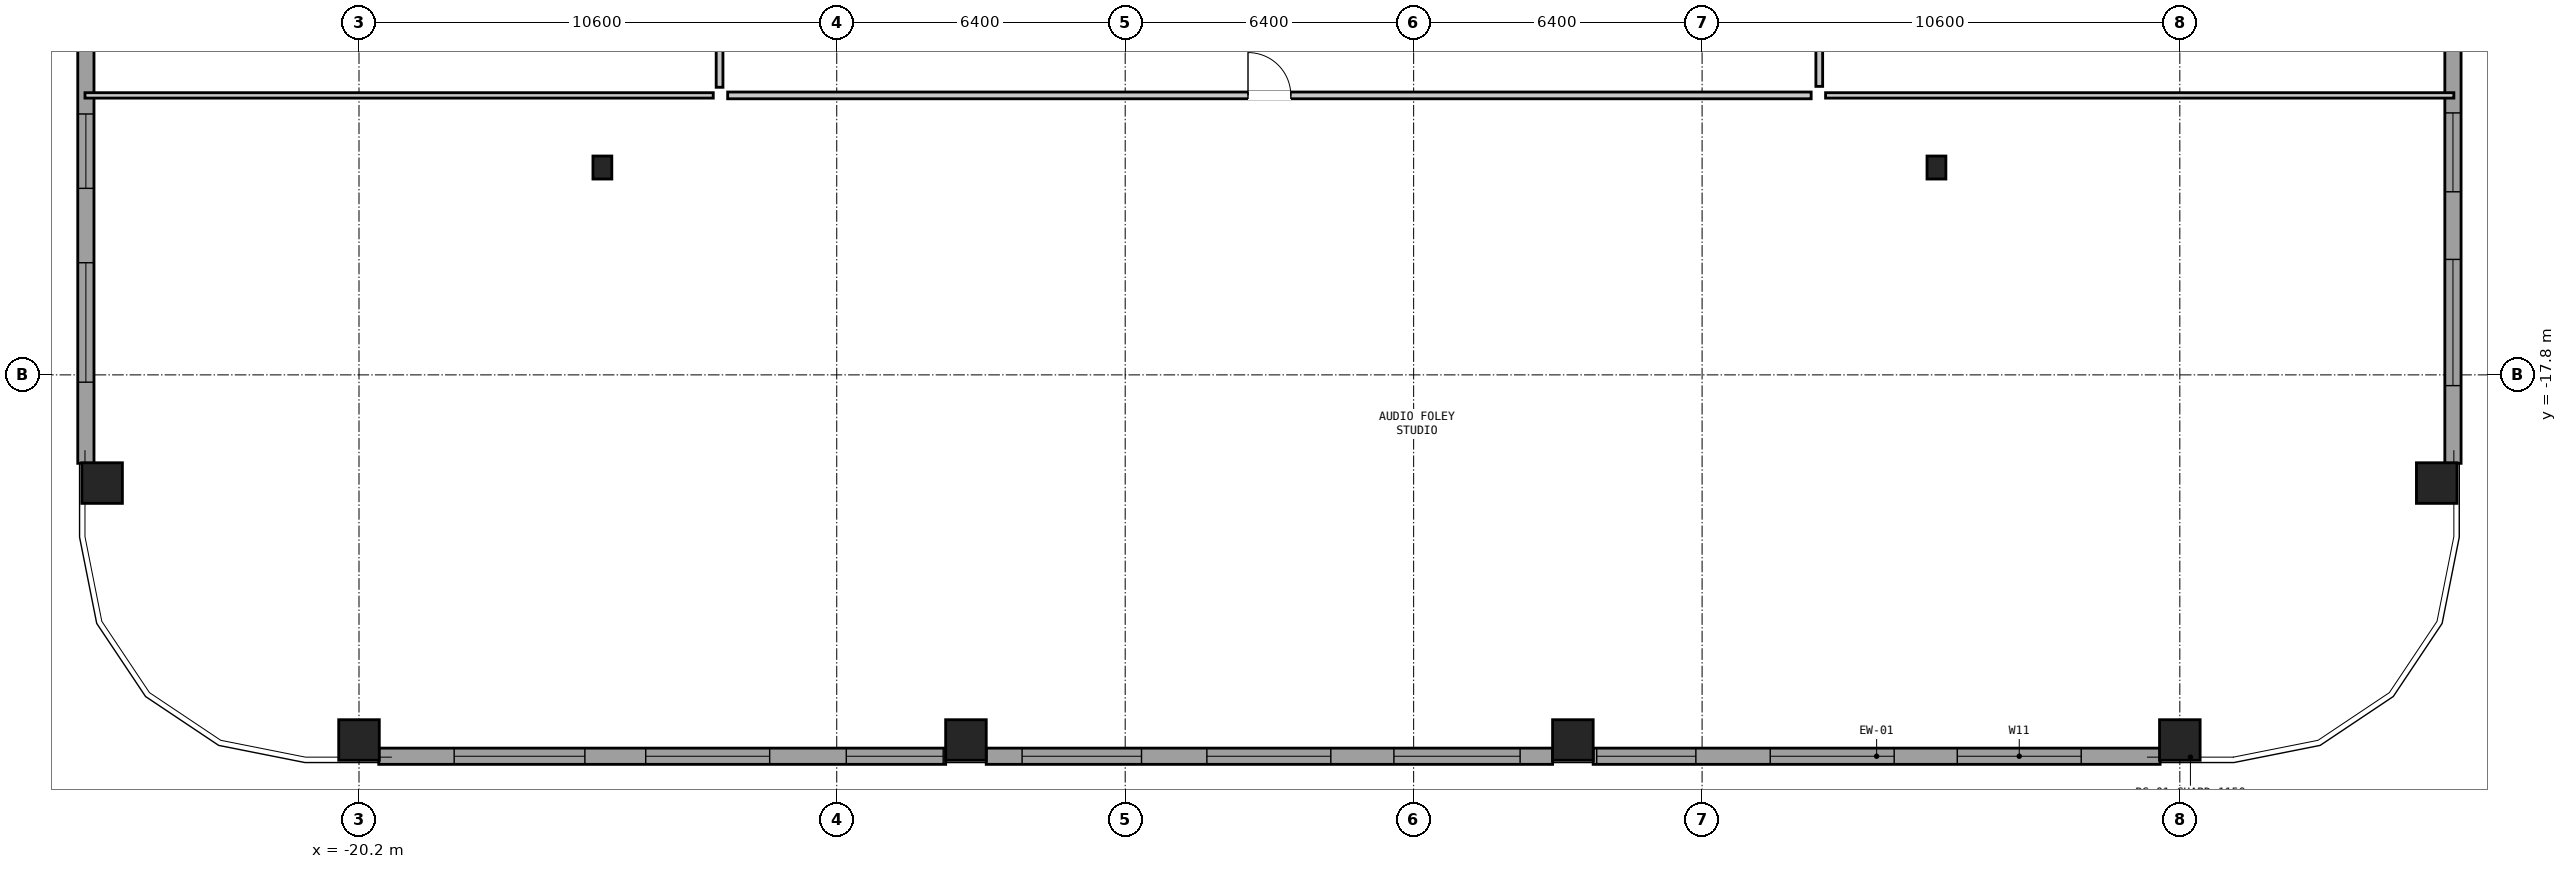
"""IFC4 building model, lengths in metres.
Left out: names, types, materials, properties, quantities, classifications, styles, units other than length and angle.
Written with IfcOpenShell. Run it as: python <this file> out.ifc"""

import sys

from ifc_helpers import new_model, si_unit, direction, frame, frame_2d, origin, origin_2d, place, context, subcontext, project, spatial, rectangle, hollow_rectangle, i_section, extrude, element, fill, save


model = new_model("IFC4")
c1 = context("Model", 3, precision=1e-05, world=origin(), true_north=direction((0.0, 1.0)))
c2 = subcontext(c1, "Body", "Model", "MODEL_VIEW")
j1 = project(units=[si_unit("LENGTHUNIT", "METRE"), si_unit("PLANEANGLEUNIT", "RADIAN")], contexts=[c1])
p1 = place(None, origin())
s1 = spatial("IfcSite", under=j1, at=p1, CompositionType="ELEMENT")
p2 = place(p1, origin())
s2 = spatial("IfcBuilding", under=s1, at=p2, CompositionType="ELEMENT")
p3 = place(p2, frame((0.0, 0.0, 29.15)))
s3 = spatial("IfcBuildingStorey", under=s2, at=p3, CompositionType="ELEMENT", Elevation=29.15)
for number, where, z_axis, x_axis in (
    (1, (-20.2, -25.9, 0.0), (0.0, 0.0, 1.0), (1.0, 0.0, 0.0)),
    (2, (-6.733, -25.9, 0.0), (0.0, 0.0, 1.0), (1.0, 0.0, 0.0)),
    (3, (6.733, -25.9, 0.0), (0.0, 0.0, 1.0), (1.0, 0.0, 0.0)),
    (4, (20.2, -25.9, 0.0), (0.0, 0.0, 1.0), (1.0, 0.0, 0.0)),
    (5, (25.9, -20.2, 0.0), (0.0, 0.0, 1.0), (0.0, 1.0, 0.0)),
    (6, (-25.9, -20.2, 0.0), (0.0, 0.0, 1.0), (0.0, 1.0, 0.0)),
):
    element("IfcColumn", number, at=place(p3, frame(where, z_axis=z_axis, x_axis=x_axis)), inside=s3, PredefinedType="COLUMN", context=c2, shape_type="SweptSolid", body=[
        extrude(hollow_rectangle(XDim=0.9, YDim=0.9, WallThickness=0.055, at=origin_2d()), origin(), (0.0, 0.0, 1.0), 3.05),
    ])
for number, where, z_axis, x_axis in (
    (7, (-14.8, -13.2, 0.0), (0.0, 0.0, 1.0), (1.0, 0.0, 0.0)),
    (8, (14.8, -13.2, 0.0), (0.0, 0.0, 1.0), (1.0, 0.0, 0.0)),
):
    element("IfcColumn", number, at=place(p3, frame(where, z_axis=z_axis, x_axis=x_axis)), inside=s3, PredefinedType="COLUMN", context=c2, shape_type="SweptSolid", body=[
        extrude(i_section(OverallWidth=0.418, OverallDepth=0.51, WebThickness=0.042, FlangeThickness=0.068, at=origin_2d()), origin(), (0.0, 0.0, 1.0), 3.05),
    ])
p4 = place(p3, frame((19.762, -26.26, 0.0), z_axis=(0.0, 0.0, 1.0), x_axis=(-1.0, 0.0, 0.0)))
e9 = element("IfcWall", 9, at=p4, inside=s3, PredefinedType="SOLIDWALL", context=c2, shape_type="SweptSolid", body=[
    extrude(rectangle(XDim=12.579, YDim=0.36, at=frame_2d((6.289, 0.0))), origin(), (0.0, 0.0, 1.0), 2.067),
])
p5 = place(p4, frame((1.75, 0.0, 0.2)))
e10 = element("IfcOpeningElement", 10, at=p5, cuts=e9, PredefinedType="OPENING", context=c2, shape_type="SweptSolid", body=[
    extrude(rectangle(XDim=2.75, YDim=0.95, at=frame_2d((1.375, 0.475))), frame((0.0, 0.192, 0.0), z_axis=(0.0, -1.0, 0.0), x_axis=(1.0, 0.0, 0.0)), (0.0, 0.0, 1.0), 0.384),
])
p6 = place(p4, frame((5.9, 0.0, 0.95)))
e11 = element("IfcOpeningElement", 11, at=p6, cuts=e9, PredefinedType="OPENING", context=c2, shape_type="SweptSolid", body=[
    extrude(rectangle(XDim=2.75, YDim=0.95, at=frame_2d((1.375, 0.475))), frame((0.0, 0.192, 0.0), z_axis=(0.0, -1.0, 0.0), x_axis=(1.0, 0.0, 0.0)), (0.0, 0.0, 1.0), 0.384),
])
p7 = place(p4, frame((10.3, 0.0, 0.2)))
e12 = element("IfcOpeningElement", 12, at=p7, cuts=e9, PredefinedType="OPENING", context=c2, shape_type="SweptSolid", body=[
    extrude(rectangle(XDim=2.2, YDim=1.1, at=frame_2d((1.1, 0.55))), frame((0.0, 0.192, 0.0), z_axis=(0.0, -1.0, 0.0), x_axis=(1.0, 0.0, 0.0)), (0.0, 0.0, 1.0), 0.384),
])
p8 = place(p3, frame((6.283, -26.26, 0.0), z_axis=(0.0, 0.0, 1.0), x_axis=(-1.0, 0.0, 0.0)))
e13 = element("IfcWall", 13, at=p8, inside=s3, PredefinedType="SOLIDWALL", context=c2, shape_type="SweptSolid", body=[
    extrude(rectangle(XDim=12.566, YDim=0.36, at=frame_2d((6.283, 0.0))), origin(), (0.0, 0.0, 1.0), 2.067),
])
p9 = place(p8, frame((0.721, 0.0, 0.95)))
e14 = element("IfcOpeningElement", 14, at=p9, cuts=e13, PredefinedType="OPENING", context=c2, shape_type="SweptSolid", body=[
    extrude(rectangle(XDim=2.8, YDim=0.95, at=frame_2d((1.4, 0.475))), frame((0.0, 0.192, 0.0), z_axis=(0.0, -1.0, 0.0), x_axis=(1.0, 0.0, 0.0)), (0.0, 0.0, 1.0), 0.384),
])
p10 = place(p8, frame((4.921, 0.0, 0.2)))
e15 = element("IfcOpeningElement", 15, at=p10, cuts=e13, PredefinedType="OPENING", context=c2, shape_type="SweptSolid", body=[
    extrude(rectangle(XDim=2.75, YDim=0.95, at=frame_2d((1.375, 0.475))), frame((0.0, 0.192, 0.0), z_axis=(0.0, -1.0, 0.0), x_axis=(1.0, 0.0, 0.0)), (0.0, 0.0, 1.0), 0.384),
])
p11 = place(p8, frame((9.121, 0.0, 0.9)))
e16 = element("IfcOpeningElement", 16, at=p11, cuts=e13, PredefinedType="OPENING", context=c2, shape_type="SweptSolid", body=[
    extrude(rectangle(XDim=2.65, YDim=1.0, at=frame_2d((1.325, 0.5))), frame((0.0, 0.192, 0.0), z_axis=(0.0, -1.0, 0.0), x_axis=(1.0, 0.0, 0.0)), (0.0, 0.0, 1.0), 0.384),
])
p12 = place(p3, frame((-7.183, -26.26, 0.0), z_axis=(0.0, 0.0, 1.0), x_axis=(-1.0, 0.0, 0.0)))
e17 = element("IfcWall", 17, at=p12, inside=s3, PredefinedType="SOLIDWALL", context=c2, shape_type="SweptSolid", body=[
    extrude(rectangle(XDim=12.579, YDim=0.36, at=frame_2d((6.289, 0.0))), origin(), (0.0, 0.0, 1.0), 2.067),
])
p13 = place(p12, frame((0.055, 0.0, 0.2)))
e18 = element("IfcOpeningElement", 18, at=p13, cuts=e17, PredefinedType="OPENING", context=c2, shape_type="SweptSolid", body=[
    extrude(rectangle(XDim=2.15, YDim=1.15, at=frame_2d((1.075, 0.575))), frame((0.0, 0.192, 0.0), z_axis=(0.0, -1.0, 0.0), x_axis=(1.0, 0.0, 0.0)), (0.0, 0.0, 1.0), 0.384),
])
p14 = place(p12, frame((3.905, 0.0, 0.95)))
e19 = element("IfcOpeningElement", 19, at=p14, cuts=e17, PredefinedType="OPENING", context=c2, shape_type="SweptSolid", body=[
    extrude(rectangle(XDim=2.75, YDim=0.95, at=frame_2d((1.375, 0.475))), frame((0.0, 0.192, 0.0), z_axis=(0.0, -1.0, 0.0), x_axis=(1.0, 0.0, 0.0)), (0.0, 0.0, 1.0), 0.384),
])
p15 = place(p12, frame((8.005, 0.0, 0.2)))
e20 = element("IfcOpeningElement", 20, at=p15, cuts=e17, PredefinedType="OPENING", context=c2, shape_type="SweptSolid", body=[
    extrude(rectangle(XDim=2.9, YDim=0.9, at=frame_2d((1.45, 0.45))), frame((0.0, 0.192, 0.0), z_axis=(0.0, -1.0, 0.0), x_axis=(1.0, 0.0, 0.0)), (0.0, 0.0, 1.0), 0.384),
])
p16 = place(p3, frame((26.26, -7.183, 0.0), z_axis=(0.0, 0.0, 1.0), x_axis=(0.0, -1.0, 0.0)))
e21 = element("IfcWall", 21, at=p16, inside=s3, PredefinedType="SOLIDWALL", context=c2, shape_type="SweptSolid", body=[
    extrude(rectangle(XDim=12.579, YDim=0.36, at=frame_2d((6.289, 0.0))), origin(), (0.0, 0.0, 1.0), 2.067),
])
p17 = place(p16, frame((0.055, 0.0, 0.2)))
e22 = element("IfcOpeningElement", 22, at=p17, cuts=e21, PredefinedType="OPENING", context=c2, shape_type="SweptSolid", body=[
    extrude(rectangle(XDim=2.25, YDim=1.15, at=frame_2d((1.125, 0.575))), frame((0.0, 0.192, 0.0), z_axis=(0.0, -1.0, 0.0), x_axis=(1.0, 0.0, 0.0)), (0.0, 0.0, 1.0), 0.384),
])
p18 = place(p16, frame((4.805, 0.0, 0.8)))
e23 = element("IfcOpeningElement", 23, at=p18, cuts=e21, PredefinedType="OPENING", context=c2, shape_type="SweptSolid", body=[
    extrude(rectangle(XDim=1.75, YDim=1.1, at=frame_2d((0.875, 0.55))), frame((0.0, 0.192, 0.0), z_axis=(0.0, -1.0, 0.0), x_axis=(1.0, 0.0, 0.0)), (0.0, 0.0, 1.0), 0.384),
])
p19 = place(p16, frame((8.055, 0.0, 0.2)))
e24 = element("IfcOpeningElement", 24, at=p19, cuts=e21, PredefinedType="OPENING", context=c2, shape_type="SweptSolid", body=[
    extrude(rectangle(XDim=2.8, YDim=1.0, at=frame_2d((1.4, 0.5))), frame((0.0, 0.192, 0.0), z_axis=(0.0, -1.0, 0.0), x_axis=(1.0, 0.0, 0.0)), (0.0, 0.0, 1.0), 0.384),
])
p20 = place(p3, frame((-26.26, -19.762, 0.0), z_axis=(0.0, 0.0, 1.0), x_axis=(0.0, 1.0, 0.0)))
e25 = element("IfcWall", 25, at=p20, inside=s3, PredefinedType="SOLIDWALL", context=c2, shape_type="SweptSolid", body=[
    extrude(rectangle(XDim=12.579, YDim=0.36, at=frame_2d((6.289, 0.0))), origin(), (0.0, 0.0, 1.0), 2.067),
])
p21 = place(p20, frame((1.8, 0.0, 0.2)))
e26 = element("IfcOpeningElement", 26, at=p21, cuts=e25, PredefinedType="OPENING", context=c2, shape_type="SweptSolid", body=[
    extrude(rectangle(XDim=2.65, YDim=1.05, at=frame_2d((1.325, 0.525))), frame((0.0, 0.192, 0.0), z_axis=(0.0, -1.0, 0.0), x_axis=(1.0, 0.0, 0.0)), (0.0, 0.0, 1.0), 0.384),
])
p22 = place(p20, frame((6.1, 0.0, 0.75)))
e27 = element("IfcOpeningElement", 27, at=p22, cuts=e25, PredefinedType="OPENING", context=c2, shape_type="SweptSolid", body=[
    extrude(rectangle(XDim=1.65, YDim=1.15, at=frame_2d((0.825, 0.575))), frame((0.0, 0.192, 0.0), z_axis=(0.0, -1.0, 0.0), x_axis=(1.0, 0.0, 0.0)), (0.0, 0.0, 1.0), 0.384),
])
p23 = place(p20, frame((10.35, 0.0, 0.2)))
e28 = element("IfcOpeningElement", 28, at=p23, cuts=e25, PredefinedType="OPENING", context=c2, shape_type="SweptSolid", body=[
    extrude(rectangle(XDim=2.15, YDim=1.2, at=frame_2d((1.075, 0.6))), frame((0.0, 0.192, 0.0), z_axis=(0.0, -1.0, 0.0), x_axis=(1.0, 0.0, 0.0)), (0.0, 0.0, 1.0), 0.384),
])
for number, where, z_axis, x_axis in (
    (29, (-26.28, -11.6, 0.0), (0.0, 0.0, 1.0), (1.0, 0.0, 0.0)),
    (30, (12.34, -11.6, 0.0), (0.0, 0.0, 1.0), (1.0, 0.0, 0.0)),
):
    element("IfcWall", number, at=place(p3, frame(where, z_axis=z_axis, x_axis=x_axis)), inside=s3, PredefinedType="PARTITIONING", context=c2, shape_type="SweptSolid", body=[
        extrude(rectangle(XDim=13.94, YDim=0.12, at=frame_2d((6.97, 0.0))), origin(), (0.0, 0.0, 1.0), 2.274),
    ])
p24 = place(p3, frame((-12.02, -11.6, 0.0), z_axis=(0.0, 0.0, 1.0), x_axis=(1.0, 0.0, 0.0)))
e31 = element("IfcWall", 31, at=p24, inside=s3, PredefinedType="PARTITIONING", context=c2, shape_type="SweptSolid", body=[
    extrude(rectangle(XDim=24.04, YDim=0.15, at=frame_2d((12.02, 0.0))), origin(), (0.0, 0.0, 1.0), 2.274),
])
p25 = place(p24, frame((11.545, 0.0, 0.0)))
e32 = element("IfcOpeningElement", 32, at=p25, cuts=e31, PredefinedType="OPENING", context=c2, shape_type="SweptSolid", body=[
    extrude(rectangle(XDim=0.95, YDim=2.1, at=frame_2d((0.475, 1.05))), frame((0.0, 0.087, 0.0), z_axis=(0.0, -1.0, 0.0), x_axis=(1.0, 0.0, 0.0)), (0.0, 0.0, 1.0), 0.174),
])
p26 = place(p3, frame((-12.2, -11.42, 0.0), z_axis=(0.0, 0.0, 1.0), x_axis=(0.0, 1.0, 0.0)))
e33 = element("IfcWall", 33, at=p26, inside=s3, PredefinedType="PARTITIONING", context=c2, shape_type="SweptSolid", body=[
    extrude(rectangle(XDim=24.04, YDim=0.15, at=frame_2d((12.02, 0.0))), origin(), (0.0, 0.0, 1.0), 2.83),
])
p27 = place(p26, frame((11.545, 0.0, 0.0)))
e34 = element("IfcOpeningElement", 34, at=p27, cuts=e33, PredefinedType="OPENING", context=c2, shape_type="SweptSolid", body=[
    extrude(rectangle(XDim=0.95, YDim=2.1, at=frame_2d((0.475, 1.05))), frame((0.0, 0.087, 0.0), z_axis=(0.0, -1.0, 0.0), x_axis=(1.0, 0.0, 0.0)), (0.0, 0.0, 1.0), 0.174),
])
p28 = place(p3, frame((12.2, -11.4, 0.0), z_axis=(0.0, 0.0, 1.0), x_axis=(0.0, 1.0, 0.0)))
e35 = element("IfcWall", 35, at=p28, inside=s3, PredefinedType="PARTITIONING", context=c2, shape_type="SweptSolid", body=[
    extrude(rectangle(XDim=8.84, YDim=0.15, at=frame_2d((4.42, 0.0))), origin(), (0.0, 0.0, 1.0), 2.83),
])
p29 = place(p28, frame((3.945, 0.0, 0.0)))
e36 = element("IfcOpeningElement", 36, at=p29, cuts=e35, PredefinedType="OPENING", context=c2, shape_type="SweptSolid", body=[
    extrude(rectangle(XDim=0.95, YDim=2.1, at=frame_2d((0.475, 1.05))), frame((0.0, 0.087, 0.0), z_axis=(0.0, -1.0, 0.0), x_axis=(1.0, 0.0, 0.0)), (0.0, 0.0, 1.0), 0.174),
])
p30 = place(p5, origin())
e37 = element("IfcWindow", 37, at=p30, inside=s3, PartitioningType="SINGLE_PANEL", PredefinedType="WINDOW", context=c2, shape_type="SweptSolid", body=[
    extrude(rectangle(XDim=2.75, YDim=0.95, at=frame_2d((1.375, 0.475))), frame((0.0, 0.03, 0.0), z_axis=(0.0, -1.0, 0.0), x_axis=(1.0, 0.0, 0.0)), (0.0, 0.0, 1.0), 0.06),
])
fill(e10, e37)
p31 = place(p6, origin())
e38 = element("IfcWindow", 38, at=p31, inside=s3, PartitioningType="SINGLE_PANEL", PredefinedType="WINDOW", context=c2, shape_type="SweptSolid", body=[
    extrude(rectangle(XDim=2.75, YDim=0.95, at=frame_2d((1.375, 0.475))), frame((0.0, 0.03, 0.0), z_axis=(0.0, -1.0, 0.0), x_axis=(1.0, 0.0, 0.0)), (0.0, 0.0, 1.0), 0.06),
])
fill(e11, e38)
p32 = place(p7, origin())
e39 = element("IfcWindow", 39, at=p32, inside=s3, PartitioningType="SINGLE_PANEL", PredefinedType="WINDOW", context=c2, shape_type="SweptSolid", body=[
    extrude(rectangle(XDim=2.2, YDim=1.1, at=frame_2d((1.1, 0.55))), frame((0.0, 0.03, 0.0), z_axis=(0.0, -1.0, 0.0), x_axis=(1.0, 0.0, 0.0)), (0.0, 0.0, 1.0), 0.06),
])
fill(e12, e39)
p33 = place(p9, origin())
e40 = element("IfcWindow", 40, at=p33, inside=s3, PartitioningType="SINGLE_PANEL", PredefinedType="WINDOW", context=c2, shape_type="SweptSolid", body=[
    extrude(rectangle(XDim=2.8, YDim=0.95, at=frame_2d((1.4, 0.475))), frame((0.0, 0.03, 0.0), z_axis=(0.0, -1.0, 0.0), x_axis=(1.0, 0.0, 0.0)), (0.0, 0.0, 1.0), 0.06),
])
fill(e14, e40)
p34 = place(p10, origin())
e41 = element("IfcWindow", 41, at=p34, inside=s3, PartitioningType="SINGLE_PANEL", PredefinedType="WINDOW", context=c2, shape_type="SweptSolid", body=[
    extrude(rectangle(XDim=2.75, YDim=0.95, at=frame_2d((1.375, 0.475))), frame((0.0, 0.03, 0.0), z_axis=(0.0, -1.0, 0.0), x_axis=(1.0, 0.0, 0.0)), (0.0, 0.0, 1.0), 0.06),
])
fill(e15, e41)
p35 = place(p11, origin())
e42 = element("IfcWindow", 42, at=p35, inside=s3, PartitioningType="SINGLE_PANEL", PredefinedType="WINDOW", context=c2, shape_type="SweptSolid", body=[
    extrude(rectangle(XDim=2.65, YDim=1.0, at=frame_2d((1.325, 0.5))), frame((0.0, 0.03, 0.0), z_axis=(0.0, -1.0, 0.0), x_axis=(1.0, 0.0, 0.0)), (0.0, 0.0, 1.0), 0.06),
])
fill(e16, e42)
p36 = place(p13, origin())
e43 = element("IfcWindow", 43, at=p36, inside=s3, PartitioningType="SINGLE_PANEL", PredefinedType="WINDOW", context=c2, shape_type="SweptSolid", body=[
    extrude(rectangle(XDim=2.15, YDim=1.15, at=frame_2d((1.075, 0.575))), frame((0.0, 0.03, 0.0), z_axis=(0.0, -1.0, 0.0), x_axis=(1.0, 0.0, 0.0)), (0.0, 0.0, 1.0), 0.06),
])
fill(e18, e43)
p37 = place(p14, origin())
e44 = element("IfcWindow", 44, at=p37, inside=s3, PartitioningType="SINGLE_PANEL", PredefinedType="WINDOW", context=c2, shape_type="SweptSolid", body=[
    extrude(rectangle(XDim=2.75, YDim=0.95, at=frame_2d((1.375, 0.475))), frame((0.0, 0.03, 0.0), z_axis=(0.0, -1.0, 0.0), x_axis=(1.0, 0.0, 0.0)), (0.0, 0.0, 1.0), 0.06),
])
fill(e19, e44)
p38 = place(p15, origin())
e45 = element("IfcWindow", 45, at=p38, inside=s3, PartitioningType="SINGLE_PANEL", PredefinedType="WINDOW", context=c2, shape_type="SweptSolid", body=[
    extrude(rectangle(XDim=2.9, YDim=0.9, at=frame_2d((1.45, 0.45))), frame((0.0, 0.03, 0.0), z_axis=(0.0, -1.0, 0.0), x_axis=(1.0, 0.0, 0.0)), (0.0, 0.0, 1.0), 0.06),
])
fill(e20, e45)
p39 = place(p18, origin())
e46 = element("IfcWindow", 46, at=p39, inside=s3, PartitioningType="SINGLE_PANEL", PredefinedType="WINDOW", context=c2, shape_type="SweptSolid", body=[
    extrude(rectangle(XDim=1.75, YDim=1.1, at=frame_2d((0.875, 0.55))), frame((0.0, 0.03, 0.0), z_axis=(0.0, -1.0, 0.0), x_axis=(1.0, 0.0, 0.0)), (0.0, 0.0, 1.0), 0.06),
])
fill(e23, e46)
p40 = place(p19, origin())
e47 = element("IfcWindow", 47, at=p40, inside=s3, PartitioningType="SINGLE_PANEL", PredefinedType="WINDOW", context=c2, shape_type="SweptSolid", body=[
    extrude(rectangle(XDim=2.8, YDim=1.0, at=frame_2d((1.4, 0.5))), frame((0.0, 0.03, 0.0), z_axis=(0.0, -1.0, 0.0), x_axis=(1.0, 0.0, 0.0)), (0.0, 0.0, 1.0), 0.06),
])
fill(e24, e47)
p41 = place(p21, origin())
e48 = element("IfcWindow", 48, at=p41, inside=s3, PartitioningType="SINGLE_PANEL", PredefinedType="WINDOW", context=c2, shape_type="SweptSolid", body=[
    extrude(rectangle(XDim=2.65, YDim=1.05, at=frame_2d((1.325, 0.525))), frame((0.0, 0.03, 0.0), z_axis=(0.0, -1.0, 0.0), x_axis=(1.0, 0.0, 0.0)), (0.0, 0.0, 1.0), 0.06),
])
fill(e26, e48)
p42 = place(p22, origin())
e49 = element("IfcWindow", 49, at=p42, inside=s3, PartitioningType="SINGLE_PANEL", PredefinedType="WINDOW", context=c2, shape_type="SweptSolid", body=[
    extrude(rectangle(XDim=1.65, YDim=1.15, at=frame_2d((0.825, 0.575))), frame((0.0, 0.03, 0.0), z_axis=(0.0, -1.0, 0.0), x_axis=(1.0, 0.0, 0.0)), (0.0, 0.0, 1.0), 0.06),
])
fill(e27, e49)
p43 = place(p25, origin())
e50 = element("IfcDoor", 50, at=p43, inside=s3, OperationType="SINGLE_SWING_LEFT", PredefinedType="DOOR", context=c2, shape_type="SweptSolid", body=[
    extrude(rectangle(XDim=0.95, YDim=2.1, at=frame_2d((0.475, 1.05))), frame((0.0, 0.025, 0.0), z_axis=(0.0, -1.0, 0.0), x_axis=(1.0, 0.0, 0.0)), (0.0, 0.0, 1.0), 0.05),
])
fill(e32, e50)
save(model, sys.argv[1])
